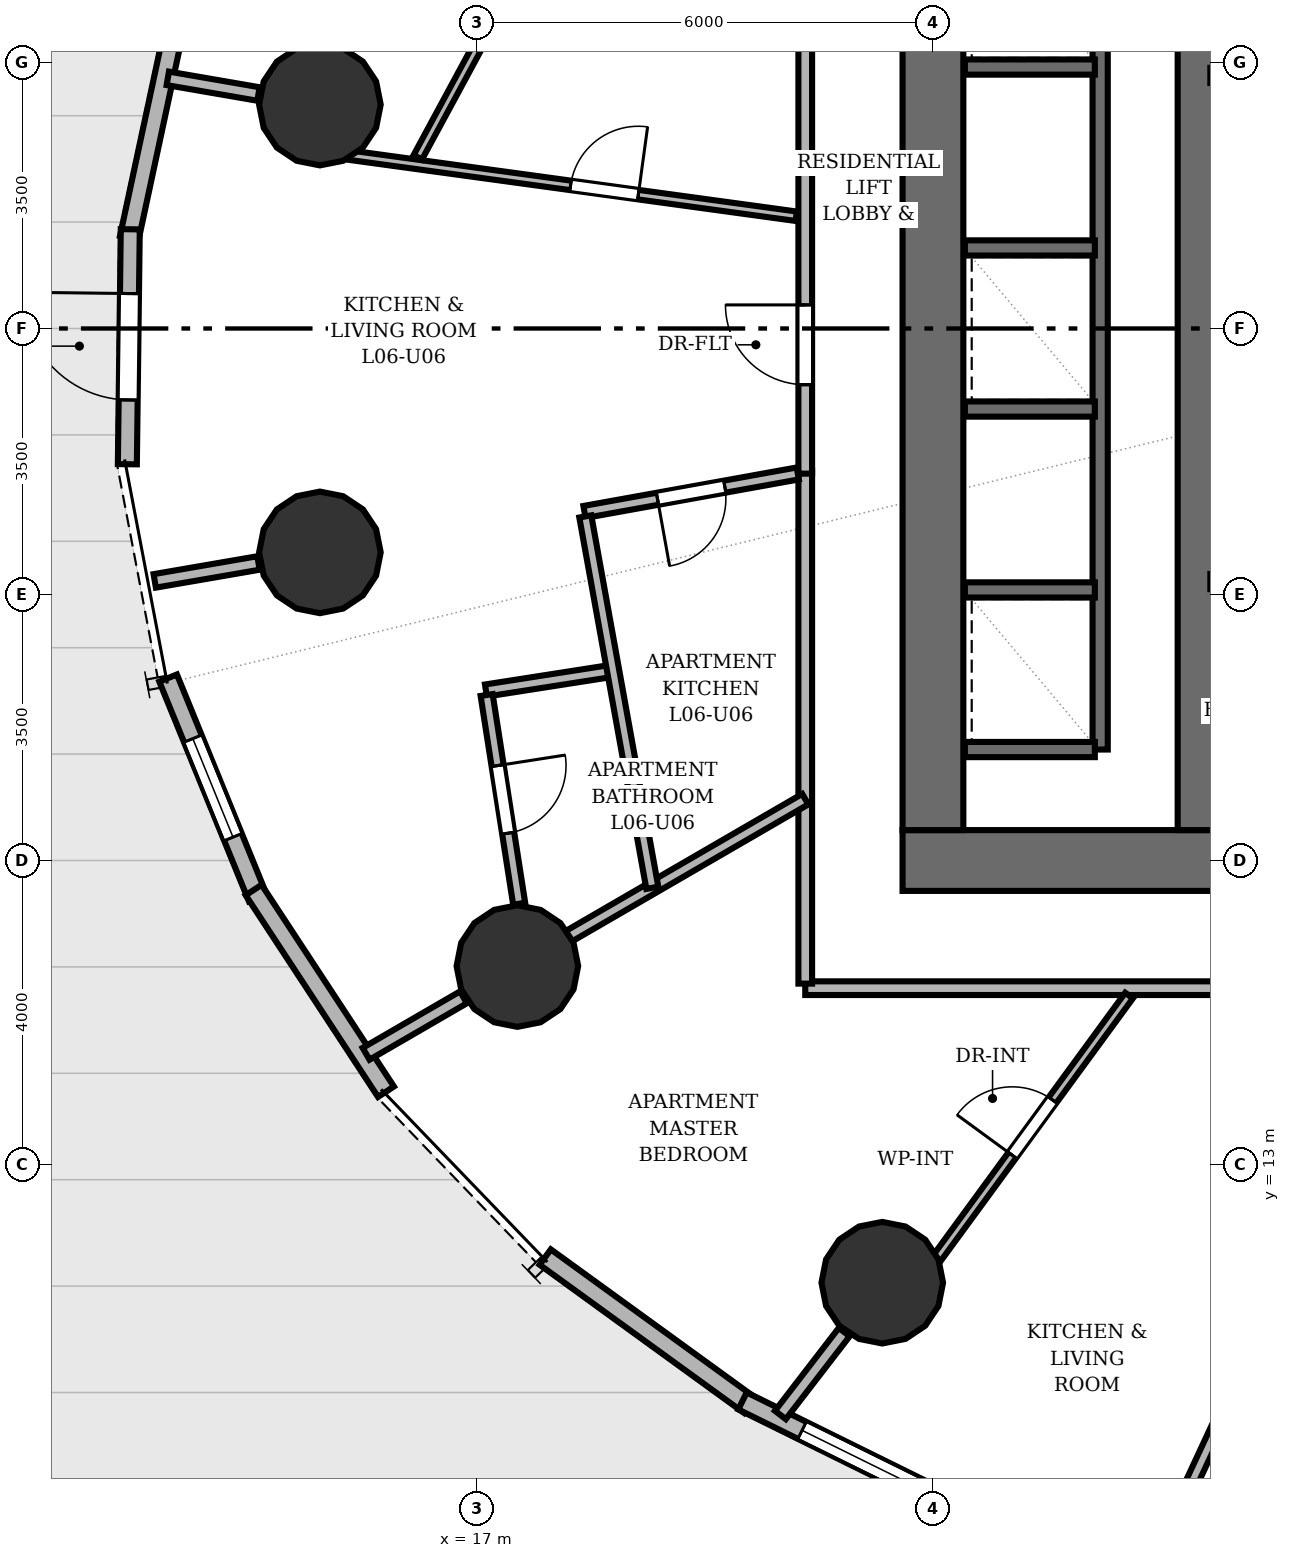
"""IFC4 building model, lengths in metres.
Left out: names, types, materials, properties, quantities, classifications, styles, units other than length and angle.
Written with IfcOpenShell. Run it as: python <this file> out.ifc"""

import sys

from ifc_helpers import new_model, si_unit, direction, frame, frame_2d, origin, origin_2d, place, context, subcontext, project, spatial, rectangle, circle, extrude, element, fill, save


model = new_model("IFC4")
c1 = context("Model", 3, precision=1e-05, world=origin(), true_north=direction((0.0, 1.0)))
c2 = subcontext(c1, "Body", "Model", "MODEL_VIEW")
j1 = project(units=[si_unit("LENGTHUNIT", "METRE"), si_unit("PLANEANGLEUNIT", "RADIAN")], contexts=[c1])
p1 = place(None, origin())
s1 = spatial("IfcSite", under=j1, at=p1, CompositionType="ELEMENT")
p2 = place(p1, origin())
s2 = spatial("IfcBuilding", under=s1, at=p2, CompositionType="ELEMENT")
p3 = place(p2, frame((0.0, 0.0, 24.8)))
s3 = spatial("IfcBuildingStorey", under=s2, at=p3, CompositionType="ELEMENT", Elevation=24.8)
p4 = place(p3, frame((22.6, 17.0, 0.0), z_axis=(0.0, 0.0, 1.0), x_axis=(1.0, 0.0, 0.0)))
e1 = element("IfcWall", 1, at=p4, inside=s3, PredefinedType="SHEAR", context=c2, shape_type="SweptSolid", body=[
    extrude(rectangle(XDim=18.8, YDim=0.8, at=frame_2d((9.4, 0.0))), origin(), (0.0, 0.0, 1.0), 3.2),
])
p5 = place(p4, frame((5.9, 0.0, 0.0)))
e2 = element("IfcOpeningElement", 2, at=p5, cuts=e1, PredefinedType="OPENING", context=c2, shape_type="SweptSolid", body=[
    extrude(rectangle(XDim=1.1, YDim=2.15, at=frame_2d((0.55, 1.075))), frame((0.0, 0.41, 0.0), z_axis=(0.0, -1.0, 0.0), x_axis=(1.0, 0.0, 0.0)), (0.0, 0.0, 1.0), 0.82),
])
p6 = place(p4, frame((9.45, 0.0, 0.0)))
e3 = element("IfcOpeningElement", 3, at=p6, cuts=e1, PredefinedType="OPENING", context=c2, shape_type="SweptSolid", body=[
    extrude(rectangle(XDim=0.9, YDim=2.1, at=frame_2d((0.45, 1.05))), frame((0.0, 0.41, 0.0), z_axis=(0.0, -1.0, 0.0), x_axis=(1.0, 0.0, 0.0)), (0.0, 0.0, 1.0), 0.82),
])
p7 = place(p3, frame((23.0, 17.4, 0.0), z_axis=(0.0, 0.0, 1.0), x_axis=(0.0, 1.0, 0.0)))
e4 = element("IfcWall", 4, at=p7, inside=s3, PredefinedType="SHEAR", context=c2, shape_type="SweptSolid", body=[
    extrude(rectangle(XDim=13.2, YDim=0.8, at=frame_2d((6.6, 0.0))), origin(), (0.0, 0.0, 1.0), 3.2),
])
p8 = place(p3, frame((26.5, 17.4, 0.0), z_axis=(0.0, 0.0, 1.0), x_axis=(0.0, 1.0, 0.0)))
e5 = element("IfcWall", 5, at=p8, inside=s3, PredefinedType="SHEAR", context=c2, shape_type="SweptSolid", body=[
    extrude(rectangle(XDim=13.2, YDim=0.56, at=frame_2d((6.6, 0.0))), origin(), (0.0, 0.0, 1.0), 3.2),
])
for number, where, z_axis, x_axis in (
    (6, (14.934, 26.946, 0.0), (0.0, 0.0, 1.0), (1.0, 0.0, 0.0)),
    (7, (14.934, 21.054, 0.0), (0.0, 0.0, 1.0), (1.0, 0.0, 0.0)),
    (8, (17.532, 15.611, 0.0), (0.0, 0.0, 1.0), (1.0, 0.0, 0.0)),
    (9, (22.333, 11.445, 0.0), (0.0, 0.0, 1.0), (1.0, 0.0, 0.0)),
):
    element("IfcColumn", number, at=place(p3, frame(where, z_axis=z_axis, x_axis=x_axis)), inside=s3, PredefinedType="COLUMN", context=c2, shape_type="SweptSolid", body=[
        extrude(circle(Radius=0.8, at=origin_2d()), origin(), (0.0, 0.0, 1.0), 3.2),
    ])
p9 = place(p3, frame((12.427, 25.192, 0.0), z_axis=(0.0, 0.0, 1.0), x_axis=(0.209668000253, 0.977772637002, 0.0)))
e10 = element("IfcWall", 10, at=p9, inside=s3, PredefinedType="SOLIDWALL", context=c2, shape_type="SweptSolid", body=[
    extrude(rectangle(XDim=3.121, YDim=0.25, at=frame_2d((1.56, 0.0))), origin(), (0.0, 0.0, 1.0), 2.96),
])
p10 = place(p3, frame((12.401, 22.214, 0.0), z_axis=(0.0, 0.0, 1.0), x_axis=(0.012397373015, 0.999923149618, 0.0)))
e11 = element("IfcWall", 11, at=p10, inside=s3, PredefinedType="SOLIDWALL", context=c2, shape_type="SweptSolid", body=[
    extrude(rectangle(XDim=3.092, YDim=0.25, at=frame_2d((1.546, 0.0))), origin(), (0.0, 0.0, 1.0), 2.96),
])
p11 = place(p10, frame((0.846, 0.0, 0.0)))
e12 = element("IfcOpeningElement", 12, at=p11, cuts=e11, PredefinedType="OPENING", context=c2, shape_type="SweptSolid", body=[
    extrude(rectangle(XDim=1.4, YDim=2.2, at=frame_2d((0.7, 1.1))), frame((0.0, 0.135, 0.0), z_axis=(0.0, -1.0, 0.0), x_axis=(1.0, 0.0, 0.0)), (0.0, 0.0, 1.0), 0.27),
])
p12 = place(p3, frame((14.115, 16.511, 0.0), z_axis=(0.0, 0.0, 1.0), x_axis=(-0.377493207518, 0.926012353199, 0.0)))
e13 = element("IfcWall", 13, at=p12, inside=s3, PredefinedType="SOLIDWALL", context=c2, shape_type="SweptSolid", body=[
    extrude(rectangle(XDim=3.121, YDim=0.25, at=frame_2d((1.56, 0.0))), origin(), (0.0, 0.0, 1.0), 2.96),
])
p13 = place(p12, frame((0.86, 0.0, 0.85)))
e14 = element("IfcOpeningElement", 14, at=p13, cuts=e13, PredefinedType="OPENING", context=c2, shape_type="SweptSolid", body=[
    extrude(rectangle(XDim=1.4, YDim=1.55, at=frame_2d((0.7, 0.775))), frame((0.0, 0.135, 0.0), z_axis=(0.0, -1.0, 0.0), x_axis=(1.0, 0.0, 0.0)), (0.0, 0.0, 1.0), 0.27),
])
p14 = place(p3, frame((15.804, 13.958, 0.0), z_axis=(0.0, 0.0, 1.0), x_axis=(-0.548579153619, 0.836098625889, 0.0)))
e15 = element("IfcWall", 15, at=p14, inside=s3, PredefinedType="SOLIDWALL", context=c2, shape_type="SweptSolid", body=[
    extrude(rectangle(XDim=3.174, YDim=0.25, at=frame_2d((1.587, 0.0))), origin(), (0.0, 0.0, 1.0), 2.96),
])
p15 = place(p3, frame((20.589, 9.832, 0.0), z_axis=(0.0, 0.0, 1.0), x_axis=(-0.809637503316, 0.58693024562, 0.0)))
e16 = element("IfcWall", 16, at=p15, inside=s3, PredefinedType="SOLIDWALL", context=c2, shape_type="SweptSolid", body=[
    extrude(rectangle(XDim=3.323, YDim=0.25, at=frame_2d((1.661, 0.0))), origin(), (0.0, 0.0, 1.0), 2.96),
])
p16 = place(p3, frame((23.542, 8.385, 0.0), z_axis=(0.0, 0.0, 1.0), x_axis=(-0.896727977212, 0.442582122193, 0.0)))
e17 = element("IfcWall", 17, at=p16, inside=s3, PredefinedType="SOLIDWALL", context=c2, shape_type="SweptSolid", body=[
    extrude(rectangle(XDim=3.399, YDim=0.25, at=frame_2d((1.7, 0.0))), origin(), (0.0, 0.0, 1.0), 2.96),
])
p17 = place(p16, frame((0.875, 0.0, 0.85)))
e18 = element("IfcOpeningElement", 18, at=p17, cuts=e17, PredefinedType="OPENING", context=c2, shape_type="SweptSolid", body=[
    extrude(rectangle(XDim=1.65, YDim=1.29, at=frame_2d((0.825, 0.645))), frame((0.0, 0.135, 0.0), z_axis=(0.0, -1.0, 0.0), x_axis=(1.0, 0.0, 0.0)), (0.0, 0.0, 1.0), 0.27),
])
p18 = place(p3, frame((26.65, 27.33, 0.0), z_axis=(0.0, 0.0, 1.0), x_axis=(1.0, 0.0, 0.0)))
e19 = element("IfcWall", 19, at=p18, inside=s3, PredefinedType="SHEAR", context=c2, shape_type="SweptSolid", body=[
    extrude(rectangle(XDim=3.24, YDim=0.2, at=frame_2d((1.62, 0.0))), origin(), (0.0, 0.0, 1.0), 3.2),
])
p19 = place(p3, frame((26.65, 20.67, 0.0), z_axis=(0.0, 0.0, 1.0), x_axis=(1.0, 0.0, 0.0)))
e20 = element("IfcWall", 20, at=p19, inside=s3, PredefinedType="SHEAR", context=c2, shape_type="SweptSolid", body=[
    extrude(rectangle(XDim=3.24, YDim=0.2, at=frame_2d((1.62, 0.0))), origin(), (0.0, 0.0, 1.0), 3.2),
])
p20 = place(p19, frame((1.055, 0.0, 0.0)))
e21 = element("IfcOpeningElement", 21, at=p20, cuts=e20, PredefinedType="OPENING", context=c2, shape_type="SweptSolid", body=[
    extrude(rectangle(XDim=1.05, YDim=2.15, at=frame_2d((0.525, 1.075))), frame((0.0, 0.11, 0.0), z_axis=(0.0, -1.0, 0.0), x_axis=(1.0, 0.0, 0.0)), (0.0, 0.0, 1.0), 0.22),
])
p21 = place(p3, frame((25.2, 18.46, 0.0), z_axis=(0.0, 0.0, 1.0), x_axis=(0.0, 1.0, 0.0)))
e22 = element("IfcWall", 22, at=p21, inside=s3, PredefinedType="SHEAR", context=c2, shape_type="SweptSolid", body=[
    extrude(rectangle(XDim=11.08, YDim=0.2, at=frame_2d((5.54, 0.0))), origin(), (0.0, 0.0, 1.0), 3.2),
])
for number, where, z_axis, x_axis in (
    (23, (23.42, 18.46, 0.0), (0.0, 0.0, 1.0), (1.0, 0.0, 0.0)),
    (24, (23.42, 20.56, 0.0), (0.0, 0.0, 1.0), (1.0, 0.0, 0.0)),
    (25, (23.42, 22.94, 0.0), (0.0, 0.0, 1.0), (1.0, 0.0, 0.0)),
    (26, (23.42, 25.06, 0.0), (0.0, 0.0, 1.0), (1.0, 0.0, 0.0)),
    (27, (23.42, 27.44, 0.0), (0.0, 0.0, 1.0), (1.0, 0.0, 0.0)),
):
    element("IfcWall", number, at=place(p3, frame(where, z_axis=z_axis, x_axis=x_axis)), inside=s3, PredefinedType="SHEAR", context=c2, shape_type="SweptSolid", body=[
        extrude(rectangle(XDim=1.71, YDim=0.2, at=frame_2d((0.855, 0.0))), origin(), (0.0, 0.0, 1.0), 3.2),
    ])
p22 = place(p3, frame((14.126, 27.085, 0.0), z_axis=(0.0, 0.0, 1.0), x_axis=(-0.985412344637, 0.170183756676, 0.0)))
e28 = element("IfcWall", 28, at=p22, inside=s3, PredefinedType="PARTITIONING", context=c2, shape_type="SweptSolid", body=[
    extrude(rectangle(XDim=1.211, YDim=0.18, at=frame_2d((0.605, 0.0))), origin(), (0.0, 0.0, 1.0), 2.178),
])
p23 = place(p3, frame((14.126, 20.915, 0.0), z_axis=(0.0, 0.0, 1.0), x_axis=(-0.985429571056, -0.170083980696, 0.0)))
e29 = element("IfcWall", 29, at=p23, inside=s3, PredefinedType="PARTITIONING", context=c2, shape_type="SweptSolid", body=[
    extrude(rectangle(XDim=1.385, YDim=0.18, at=frame_2d((0.693, 0.0))), origin(), (0.0, 0.0, 1.0), 2.178),
])
p24 = place(p3, frame((16.823, 15.2, 0.0), z_axis=(0.0, 0.0, 1.0), x_axis=(-0.865049792178, -0.501686014408, 0.0)))
e30 = element("IfcWall", 30, at=p24, inside=s3, PredefinedType="PARTITIONING", context=c2, shape_type="SweptSolid", body=[
    extrude(rectangle(XDim=1.481, YDim=0.18, at=frame_2d((0.74, 0.0))), origin(), (0.0, 0.0, 1.0), 2.178),
])
p25 = place(p3, frame((21.833, 10.795, 0.0), z_axis=(0.0, 0.0, 1.0), x_axis=(-0.609967804345, -0.792426196982, 0.0)))
e31 = element("IfcWall", 31, at=p25, inside=s3, PredefinedType="PARTITIONING", context=c2, shape_type="SweptSolid", body=[
    extrude(rectangle(XDim=1.377, YDim=0.18, at=frame_2d((0.688, 0.0))), origin(), (0.0, 0.0, 1.0), 2.178),
])
p26 = place(p3, frame((33.898, 15.32, 0.0), z_axis=(0.0, 0.0, 1.0), x_axis=(-1.0, 0.0, 0.0)))
e32 = element("IfcWall", 32, at=p26, inside=s3, PredefinedType="PARTITIONING", context=c2, shape_type="SweptSolid", body=[
    extrude(rectangle(XDim=12.578, YDim=0.18, at=frame_2d((6.289, 0.0))), origin(), (0.0, 0.0, 1.0), 2.955),
])
p27 = place(p26, frame((5.833, 0.0, 0.0)))
e33 = element("IfcOpeningElement", 33, at=p27, cuts=e32, PredefinedType="OPENING", context=c2, shape_type="SweptSolid", body=[
    extrude(rectangle(XDim=1.05, YDim=2.15, at=frame_2d((0.525, 1.075))), frame((0.0, 0.1, 0.0), z_axis=(0.0, -1.0, 0.0), x_axis=(1.0, 0.0, 0.0)), (0.0, 0.0, 1.0), 0.2),
])
p28 = place(p3, frame((21.32, 15.38, 0.0), z_axis=(0.0, 0.0, 1.0), x_axis=(0.0, 1.0, 0.0)))
e34 = element("IfcWall", 34, at=p28, inside=s3, PredefinedType="PARTITIONING", context=c2, shape_type="SweptSolid", body=[
    extrude(rectangle(XDim=6.749, YDim=0.18, at=frame_2d((3.374, 0.0))), origin(), (0.0, 0.0, 1.0), 2.955),
])
p29 = place(p3, frame((21.32, 22.09, 0.0), z_axis=(0.0, 0.0, 1.0), x_axis=(0.0, 1.0, 0.0)))
e35 = element("IfcWall", 35, at=p29, inside=s3, PredefinedType="PARTITIONING", context=c2, shape_type="SweptSolid", body=[
    extrude(rectangle(XDim=10.59, YDim=0.18, at=frame_2d((5.295, 0.0))), origin(), (0.0, 0.0, 1.0), 2.955),
])
p30 = place(p29, frame((1.17, 0.0, 0.0)))
e36 = element("IfcOpeningElement", 36, at=p30, cuts=e35, PredefinedType="OPENING", context=c2, shape_type="SweptSolid", body=[
    extrude(rectangle(XDim=1.05, YDim=2.15, at=frame_2d((0.525, 1.075))), frame((0.0, 0.1, 0.0), z_axis=(0.0, -1.0, 0.0), x_axis=(1.0, 0.0, 0.0)), (0.0, 0.0, 1.0), 0.2),
])
p31 = place(p3, frame((29.39, 15.229, 0.0), z_axis=(0.0, 0.0, 1.0), x_axis=(-0.421930101453, -0.906628363492, 0.0)))
e37 = element("IfcWall", 37, at=p31, inside=s3, PredefinedType="PLUMBINGWALL", context=c2, shape_type="SweptSolid", body=[
    extrude(rectangle(XDim=8.312, YDim=0.16, at=frame_2d((4.156, 0.0))), origin(), (0.0, 0.0, 1.0), 2.955),
])
p32 = place(p31, frame((3.706, 0.0, 0.0)))
e38 = element("IfcOpeningElement", 38, at=p32, cuts=e37, PredefinedType="OPENING", context=c2, shape_type="SweptSolid", body=[
    extrude(rectangle(XDim=0.9, YDim=2.1, at=frame_2d((0.45, 1.05))), frame((0.0, 0.09, 0.0), z_axis=(0.0, -1.0, 0.0), x_axis=(1.0, 0.0, 0.0)), (0.0, 0.0, 1.0), 0.18),
])
p33 = place(p3, frame((23.038, 11.747, 0.0), z_axis=(0.0, 0.0, 1.0), x_axis=(0.590387510638, 0.807119933642, 0.0)))
e39 = element("IfcWall", 39, at=p33, inside=s3, PredefinedType="PARTITIONING", context=c2, shape_type="SweptSolid", body=[
    extrude(rectangle(XDim=4.306, YDim=0.125, at=frame_2d((2.153, 0.0))), origin(), (0.0, 0.0, 1.0), 2.178),
])
p34 = place(p33, frame((1.703, 0.0, 0.0)))
e40 = element("IfcOpeningElement", 40, at=p34, cuts=e39, PredefinedType="OPENING", context=c2, shape_type="SweptSolid", body=[
    extrude(rectangle(XDim=0.9, YDim=2.1, at=frame_2d((0.45, 1.05))), frame((0.0, 0.073, 0.0), z_axis=(0.0, -1.0, 0.0), x_axis=(1.0, 0.0, 0.0)), (0.0, 0.0, 1.0), 0.145),
])
p35 = place(p3, frame((18.202, 15.999, 0.0), z_axis=(0.0, 0.0, 1.0), x_axis=(0.865099964078, 0.501599493773, 0.0)))
e41 = element("IfcWall", 41, at=p35, inside=s3, PredefinedType="PLUMBINGWALL", context=c2, shape_type="SweptSolid", body=[
    extrude(rectangle(XDim=3.605, YDim=0.16, at=frame_2d((1.802, 0.0))), origin(), (0.0, 0.0, 1.0), 2.178),
])
p36 = place(p3, frame((18.792, 19.498, 0.0), z_axis=(0.0, 0.0, 1.0), x_axis=(-0.988061441457, -0.154060338524, 0.0)))
e42 = element("IfcWall", 42, at=p36, inside=s3, PredefinedType="PLUMBINGWALL", context=c2, shape_type="SweptSolid", body=[
    extrude(rectangle(XDim=1.694, YDim=0.16, at=frame_2d((0.847, 0.0))), origin(), (0.0, 0.0, 1.0), 2.955),
])
p37 = place(p3, frame((17.128, 19.177, 0.0), z_axis=(0.0, 0.0, 1.0), x_axis=(0.154135750111, -0.988049680197, 0.0)))
e43 = element("IfcWall", 43, at=p37, inside=s3, PredefinedType="PLUMBINGWALL", context=c2, shape_type="SweptSolid", body=[
    extrude(rectangle(XDim=2.78, YDim=0.16, at=frame_2d((1.39, 0.0))), origin(), (0.0, 0.0, 1.0), 2.955),
])
p38 = place(p37, frame((0.94, 0.0, 0.0)))
e44 = element("IfcOpeningElement", 44, at=p38, cuts=e43, PredefinedType="OPENING", context=c2, shape_type="SweptSolid", body=[
    extrude(rectangle(XDim=0.9, YDim=2.1, at=frame_2d((0.45, 1.05))), frame((0.0, 0.09, 0.0), z_axis=(0.0, -1.0, 0.0), x_axis=(1.0, 0.0, 0.0)), (0.0, 0.0, 1.0), 0.18),
])
p39 = place(p3, frame((15.33, 26.28, 0.0), z_axis=(0.0, 0.0, 1.0), x_axis=(0.990775681502, -0.135512172681, 0.0)))
e45 = element("IfcWall", 45, at=p39, inside=s3, PredefinedType="PARTITIONING", context=c2, shape_type="SweptSolid", body=[
    extrude(rectangle(XDim=5.926, YDim=0.125, at=frame_2d((2.963, 0.0))), origin(), (0.0, 0.0, 1.0), 2.955),
])
p40 = place(p39, frame((2.929, 0.0, 0.0)))
e46 = element("IfcOpeningElement", 46, at=p40, cuts=e45, PredefinedType="OPENING", context=c2, shape_type="SweptSolid", body=[
    extrude(rectangle(XDim=0.9, YDim=2.1, at=frame_2d((0.45, 1.05))), frame((0.0, 0.073, 0.0), z_axis=(0.0, -1.0, 0.0), x_axis=(1.0, 0.0, 0.0)), (0.0, 0.0, 1.0), 0.145),
])
p41 = place(p3, frame((21.222, 22.093, 0.0), z_axis=(0.0, 0.0, 1.0), x_axis=(-0.984110100035, -0.177559316875, 0.0)))
e47 = element("IfcWall", 47, at=p41, inside=s3, PredefinedType="PLUMBINGWALL", context=c2, shape_type="SweptSolid", body=[
    extrude(rectangle(XDim=2.852, YDim=0.16, at=frame_2d((1.426, 0.0))), origin(), (0.0, 0.0, 1.0), 2.178),
])
p42 = place(p41, frame((0.976, 0.0, 0.0)))
e48 = element("IfcOpeningElement", 48, at=p42, cuts=e47, PredefinedType="OPENING", context=c2, shape_type="SweptSolid", body=[
    extrude(rectangle(XDim=0.9, YDim=2.1, at=frame_2d((0.45, 1.05))), frame((0.0, 0.09, 0.0), z_axis=(0.0, -1.0, 0.0), x_axis=(1.0, 0.0, 0.0)), (0.0, 0.0, 1.0), 0.18),
])
p43 = place(p3, frame((18.426, 21.527, 0.0), z_axis=(0.0, 0.0, 1.0), x_axis=(0.177634916986, -0.98409645679, 0.0)))
e49 = element("IfcWall", 49, at=p43, inside=s3, PredefinedType="PLUMBINGWALL", context=c2, shape_type="SweptSolid", body=[
    extrude(rectangle(XDim=4.966, YDim=0.16, at=frame_2d((2.483, 0.0))), origin(), (0.0, 0.0, 1.0), 2.955),
])
p44 = place(p3, frame((16.222, 26.252, 0.0), z_axis=(0.0, 0.0, 1.0), x_axis=(0.475374660533, 0.879783457519, 0.0)))
e50 = element("IfcWall", 50, at=p44, inside=s3, PredefinedType="PARTITIONING", context=c2, shape_type="SweptSolid", body=[
    extrude(rectangle(XDim=11.37, YDim=0.125, at=frame_2d((5.685, 0.0))), origin(), (0.0, 0.0, 1.0), 2.328),
])
p45 = place(p44, frame((4.255, 0.0, 0.0)))
e51 = element("IfcOpeningElement", 51, at=p45, cuts=e50, PredefinedType="OPENING", context=c2, shape_type="SweptSolid", body=[
    extrude(rectangle(XDim=0.9, YDim=2.1, at=frame_2d((0.45, 1.05))), frame((0.0, 0.073, 0.0), z_axis=(0.0, -1.0, 0.0), x_axis=(1.0, 0.0, 0.0)), (0.0, 0.0, 1.0), 0.145),
])
p46 = place(p11, origin())
e52 = element("IfcDoor", 52, at=p46, inside=s3, OperationType="SINGLE_SWING_RIGHT", PredefinedType="DOOR", context=c2, shape_type="SweptSolid", body=[
    extrude(rectangle(XDim=1.4, YDim=2.2, at=frame_2d((0.7, 1.1))), frame((0.0, 0.025, 0.0), z_axis=(0.0, -1.0, 0.0), x_axis=(1.0, 0.0, 0.0)), (0.0, 0.0, 1.0), 0.05),
])
fill(e12, e52)
p47 = place(p13, origin())
e53 = element("IfcWindow", 53, at=p47, inside=s3, PartitioningType="SINGLE_PANEL", PredefinedType="WINDOW", context=c2, shape_type="SweptSolid", body=[
    extrude(rectangle(XDim=1.4, YDim=1.55, at=frame_2d((0.7, 0.775))), frame((0.0, 0.03, 0.0), z_axis=(0.0, -1.0, 0.0), x_axis=(1.0, 0.0, 0.0)), (0.0, 0.0, 1.0), 0.06),
])
fill(e14, e53)
p48 = place(p17, origin())
e54 = element("IfcWindow", 54, at=p48, inside=s3, PartitioningType="SINGLE_PANEL", PredefinedType="WINDOW", context=c2, shape_type="SweptSolid", body=[
    extrude(rectangle(XDim=1.65, YDim=1.29, at=frame_2d((0.825, 0.645))), frame((0.0, 0.03, 0.0), z_axis=(0.0, -1.0, 0.0), x_axis=(1.0, 0.0, 0.0)), (0.0, 0.0, 1.0), 0.06),
])
fill(e18, e54)
p49 = place(p34, origin())
e55 = element("IfcDoor", 55, at=p49, inside=s3, OperationType="SINGLE_SWING_LEFT", PredefinedType="DOOR", context=c2, shape_type="SweptSolid", body=[
    extrude(rectangle(XDim=0.9, YDim=2.1, at=frame_2d((0.45, 1.05))), frame((0.0, 0.025, 0.0), z_axis=(0.0, -1.0, 0.0), x_axis=(1.0, 0.0, 0.0)), (0.0, 0.0, 1.0), 0.05),
])
fill(e40, e55)
p50 = place(p30, origin())
e56 = element("IfcDoor", 56, at=p50, inside=s3, OperationType="SINGLE_SWING_RIGHT", PredefinedType="DOOR", context=c2, shape_type="SweptSolid", body=[
    extrude(rectangle(XDim=1.05, YDim=2.15, at=frame_2d((0.525, 1.075))), frame((0.0, 0.025, 0.0), z_axis=(0.0, -1.0, 0.0), x_axis=(1.0, 0.0, 0.0)), (0.0, 0.0, 1.0), 0.05),
])
fill(e36, e56)
p51 = place(p38, origin())
e57 = element("IfcDoor", 57, at=p51, inside=s3, OperationType="SINGLE_SWING_LEFT", PredefinedType="DOOR", context=c2, shape_type="SweptSolid", body=[
    extrude(rectangle(XDim=0.9, YDim=2.1, at=frame_2d((0.45, 1.05))), frame((0.0, 0.025, 0.0), z_axis=(0.0, -1.0, 0.0), x_axis=(1.0, 0.0, 0.0)), (0.0, 0.0, 1.0), 0.05),
])
fill(e44, e57)
p52 = place(p40, origin())
e58 = element("IfcDoor", 58, at=p52, inside=s3, OperationType="SINGLE_SWING_RIGHT", PredefinedType="DOOR", context=c2, shape_type="SweptSolid", body=[
    extrude(rectangle(XDim=0.9, YDim=2.1, at=frame_2d((0.45, 1.05))), frame((0.0, 0.025, 0.0), z_axis=(0.0, -1.0, 0.0), x_axis=(1.0, 0.0, 0.0)), (0.0, 0.0, 1.0), 0.05),
])
fill(e46, e58)
p53 = place(p42, origin())
e59 = element("IfcDoor", 59, at=p53, inside=s3, OperationType="SINGLE_SWING_RIGHT", PredefinedType="DOOR", context=c2, shape_type="SweptSolid", body=[
    extrude(rectangle(XDim=0.9, YDim=2.1, at=frame_2d((0.45, 1.05))), frame((0.0, 0.025, 0.0), z_axis=(0.0, -1.0, 0.0), x_axis=(1.0, 0.0, 0.0)), (0.0, 0.0, 1.0), 0.05),
])
fill(e48, e59)
save(model, sys.argv[1])
